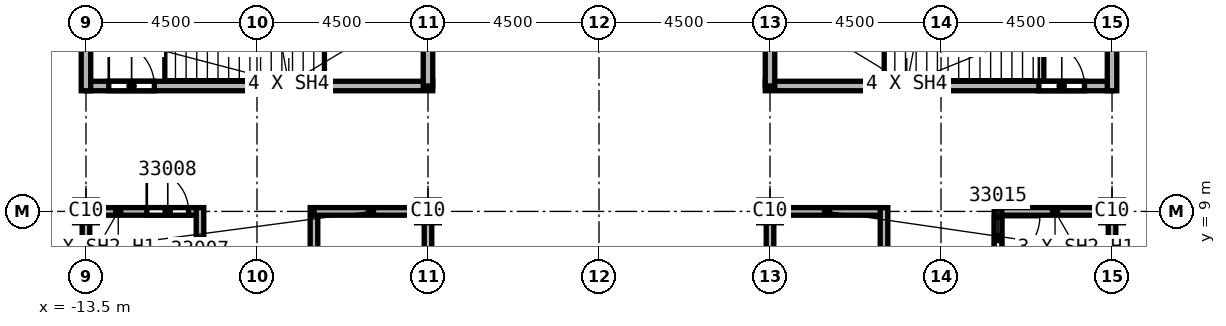
"""IFC4 building model, lengths in metres.
Left out: names, types, materials, properties, quantities, classifications, styles, units other than length and angle.
Written with IfcOpenShell. Run it as: python <this file> out.ifc"""

import sys

from ifc_helpers import new_model, si_unit, direction, frame, frame_2d, origin, origin_2d, place, context, subcontext, project, spatial, rectangle, extrude, element, fill, save


model = new_model("IFC4")
c1 = context("Model", 3, precision=1e-05, world=origin(), true_north=direction((0.0, 1.0)))
c2 = subcontext(c1, "Body", "Model", "MODEL_VIEW")
j1 = project(units=[si_unit("LENGTHUNIT", "METRE"), si_unit("PLANEANGLEUNIT", "RADIAN")], contexts=[c1])
p1 = place(None, origin())
s1 = spatial("IfcSite", under=j1, at=p1, CompositionType="ELEMENT")
p2 = place(p1, origin())
s2 = spatial("IfcBuilding", under=s1, at=p2, CompositionType="ELEMENT")
p3 = place(p2, frame((0.0, 0.0, 361.0)))
s3 = spatial("IfcBuildingStorey", under=s2, at=p3, CompositionType="ELEMENT", Elevation=361.0)
for number, where, z_axis, x_axis in (
    (1, (4.5, 9.0, 0.0), (0.0, 0.0, 1.0), (1.0, 0.0, 0.0)),
    (2, (13.5, 9.0, 0.0), (0.0, 0.0, 1.0), (1.0, 0.0, 0.0)),
    (3, (-4.5, 9.0, 0.0), (0.0, 0.0, 1.0), (1.0, 0.0, 0.0)),
    (4, (-13.5, 9.0, 0.0), (0.0, 0.0, 1.0), (1.0, 0.0, 0.0)),
):
    element("IfcColumn", number, at=place(p3, frame(where, z_axis=z_axis, x_axis=x_axis)), inside=s3, PredefinedType="COLUMN", context=c2, shape_type="SweptSolid", body=[
        extrude(rectangle(XDim=0.6, YDim=0.6, at=origin_2d()), origin(), (0.0, 0.0, 1.0), 4.6),
    ])
p4 = place(p3, frame((-13.5, 7.5, 0.0), z_axis=(0.0, 0.0, 1.0), x_axis=(0.0, 1.0, 0.0)))
e5 = element("IfcWall", 5, at=p4, inside=s3, PredefinedType="SOLIDWALL", context=c2, shape_type="SweptSolid", body=[
    extrude(rectangle(XDim=1.6, YDim=0.2, at=frame_2d((0.8, 0.0))), origin(), (0.0, 0.0, 1.0), 3.838),
])
p5 = place(p3, frame((-13.5, 9.0, 0.0), z_axis=(0.0, 0.0, 1.0), x_axis=(1.0, 0.0, 0.0)))
e6 = element("IfcWall", 6, at=p5, inside=s3, PredefinedType="SOLIDWALL", context=c2, shape_type="SweptSolid", body=[
    extrude(rectangle(XDim=3.0, YDim=0.2, at=frame_2d((1.5, 0.0))), origin(), (0.0, 0.0, 1.0), 3.838),
])
p6 = place(p5, frame((1.6, 0.0, 0.0)))
e7 = element("IfcOpeningElement", 7, at=p6, cuts=e6, PredefinedType="OPENING", context=c2, shape_type="SweptSolid", body=[
    extrude(rectangle(XDim=1.1, YDim=2.1, at=frame_2d((0.55, 1.05))), frame((0.0, 0.1, 0.0), z_axis=(0.0, -1.0, 0.0), x_axis=(1.0, 0.0, 0.0)), (0.0, 0.0, 1.0), 0.2),
])
p7 = place(p3, frame((-10.5, 7.425, 0.0), z_axis=(0.0, 0.0, 1.0), x_axis=(0.0, 1.0, 0.0)))
e8 = element("IfcWall", 8, at=p7, inside=s3, PredefinedType="SOLIDWALL", context=c2, shape_type="SweptSolid", body=[
    extrude(rectangle(XDim=1.675, YDim=0.2, at=frame_2d((0.837, 0.0))), origin(), (0.0, 0.0, 1.0), 4.15),
])
p8 = place(p3, frame((-7.5, 2.875, 0.0), z_axis=(0.0, 0.0, 1.0), x_axis=(0.0, 1.0, 0.0)))
e9 = element("IfcWall", 9, at=p8, inside=s3, PredefinedType="SOLIDWALL", context=c2, shape_type="SweptSolid", body=[
    extrude(rectangle(XDim=6.225, YDim=0.2, at=frame_2d((3.113, 0.0))), origin(), (0.0, 0.0, 1.0), 4.15),
])
p9 = place(p3, frame((-7.5, 9.0, 0.0), z_axis=(0.0, 0.0, 1.0), x_axis=(1.0, 0.0, 0.0)))
e10 = element("IfcWall", 10, at=p9, inside=s3, PredefinedType="SOLIDWALL", context=c2, shape_type="SweptSolid", body=[
    extrude(rectangle(XDim=3.0, YDim=0.2, at=frame_2d((1.5, 0.0))), origin(), (0.0, 0.0, 1.0), 3.838),
])
p10 = place(p3, frame((-4.5, 9.1, 0.0), z_axis=(0.0, 0.0, 1.0), x_axis=(0.0, -1.0, 0.0)))
e11 = element("IfcWall", 11, at=p10, inside=s3, PredefinedType="SOLIDWALL", context=c2, shape_type="SweptSolid", body=[
    extrude(rectangle(XDim=18.2, YDim=0.2, at=frame_2d((9.1, 0.0))), origin(), (0.0, 0.0, 1.0), 3.838),
])
p11 = place(p10, frame((9.95, 0.0, 0.0)))
e12 = element("IfcOpeningElement", 12, at=p11, cuts=e11, PredefinedType="OPENING", context=c2, shape_type="SweptSolid", body=[
    extrude(rectangle(XDim=1.1, YDim=2.1, at=frame_2d((0.55, 1.05))), frame((0.0, 0.1, 0.0), z_axis=(0.0, -1.0, 0.0), x_axis=(1.0, 0.0, 0.0)), (0.0, 0.0, 1.0), 0.2),
])
p12 = place(p10, frame((4.75, 0.0, 0.0)))
e13 = element("IfcOpeningElement", 13, at=p12, cuts=e11, PredefinedType="OPENING", context=c2, shape_type="SweptSolid", body=[
    extrude(rectangle(XDim=1.1, YDim=2.1, at=frame_2d((0.55, 1.05))), frame((0.0, 0.1, 0.0), z_axis=(0.0, -1.0, 0.0), x_axis=(1.0, 0.0, 0.0)), (0.0, 0.0, 1.0), 0.2),
])
p13 = place(p3, frame((4.5, -9.1, 0.0), z_axis=(0.0, 0.0, 1.0), x_axis=(0.0, 1.0, 0.0)))
e14 = element("IfcWall", 14, at=p13, inside=s3, PredefinedType="SOLIDWALL", context=c2, shape_type="SweptSolid", body=[
    extrude(rectangle(XDim=18.2, YDim=0.2, at=frame_2d((9.1, 0.0))), origin(), (0.0, 0.0, 1.0), 3.838),
])
p14 = place(p13, frame((5.5, 0.0, 0.0)))
e15 = element("IfcOpeningElement", 15, at=p14, cuts=e14, PredefinedType="OPENING", context=c2, shape_type="SweptSolid", body=[
    extrude(rectangle(XDim=1.1, YDim=2.1, at=frame_2d((0.55, 1.05))), frame((0.0, 0.1, 0.0), z_axis=(0.0, -1.0, 0.0), x_axis=(1.0, 0.0, 0.0)), (0.0, 0.0, 1.0), 0.2),
])
p15 = place(p13, frame((13.7, 0.0, 0.0)))
e16 = element("IfcOpeningElement", 16, at=p15, cuts=e14, PredefinedType="OPENING", context=c2, shape_type="SweptSolid", body=[
    extrude(rectangle(XDim=1.1, YDim=2.1, at=frame_2d((0.55, 1.05))), frame((0.0, 0.1, 0.0), z_axis=(0.0, -1.0, 0.0), x_axis=(1.0, 0.0, 0.0)), (0.0, 0.0, 1.0), 0.2),
])
p16 = place(p3, frame((4.5, 9.0, 0.0), z_axis=(0.0, 0.0, 1.0), x_axis=(1.0, 0.0, 0.0)))
e17 = element("IfcWall", 17, at=p16, inside=s3, PredefinedType="SOLIDWALL", context=c2, shape_type="SweptSolid", body=[
    extrude(rectangle(XDim=3.0, YDim=0.2, at=frame_2d((1.5, 0.0))), origin(), (0.0, 0.0, 1.0), 3.838),
])
p17 = place(p3, frame((7.5, 9.1, 0.0), z_axis=(0.0, 0.0, 1.0), x_axis=(0.0, -1.0, 0.0)))
e18 = element("IfcWall", 18, at=p17, inside=s3, PredefinedType="SOLIDWALL", context=c2, shape_type="SweptSolid", body=[
    extrude(rectangle(XDim=6.225, YDim=0.2, at=frame_2d((3.113, 0.0))), origin(), (0.0, 0.0, 1.0), 4.15),
])
p18 = place(p3, frame((10.5, 9.0, 0.0), z_axis=(0.0, 0.0, 1.0), x_axis=(1.0, 0.0, 0.0)))
e19 = element("IfcWall", 19, at=p18, inside=s3, PredefinedType="SOLIDWALL", context=c2, shape_type="SweptSolid", body=[
    extrude(rectangle(XDim=3.0, YDim=0.2, at=frame_2d((1.5, 0.0))), origin(), (0.0, 0.0, 1.0), 3.838),
])
p19 = place(p3, frame((10.5, 9.1, 0.0), z_axis=(0.0, 0.0, 1.0), x_axis=(0.0, -1.0, 0.0)))
e20 = element("IfcWall", 20, at=p19, inside=s3, PredefinedType="SOLIDWALL", context=c2, shape_type="SweptSolid", body=[
    extrude(rectangle(XDim=3.225, YDim=0.2, at=frame_2d((1.613, 0.0))), origin(), (0.0, 0.0, 1.0), 4.15),
])
p20 = place(p19, frame((0.25, 0.0, 0.0)))
e21 = element("IfcOpeningElement", 21, at=p20, cuts=e20, PredefinedType="OPENING", context=c2, shape_type="SweptSolid", body=[
    extrude(rectangle(XDim=1.1, YDim=2.1, at=frame_2d((0.55, 1.05))), frame((0.0, 0.1, 0.0), z_axis=(0.0, -1.0, 0.0), x_axis=(1.0, 0.0, 0.0)), (0.0, 0.0, 1.0), 0.2),
])
p21 = place(p3, frame((13.5, 9.1, 0.0), z_axis=(0.0, 0.0, 1.0), x_axis=(0.0, -1.0, 0.0)))
e22 = element("IfcWall", 22, at=p21, inside=s3, PredefinedType="SOLIDWALL", context=c2, shape_type="SweptSolid", body=[
    extrude(rectangle(XDim=3.1, YDim=0.2, at=frame_2d((1.55, 0.0))), origin(), (0.0, 0.0, 1.0), 3.838),
])
p22 = place(p3, frame((-13.5, 12.3, 0.0), z_axis=(0.0, 0.0, 1.0), x_axis=(1.0, 0.0, 0.0)))
e23 = element("IfcWall", 23, at=p22, inside=s3, PredefinedType="SOLIDWALL", context=c2, shape_type="SweptSolid", body=[
    extrude(rectangle(XDim=9.125, YDim=0.25, at=frame_2d((4.562, 0.0))), origin(), (0.0, 0.0, 1.0), 4.15),
])
p23 = place(p22, frame((0.6, 0.0, 0.0)))
e24 = element("IfcOpeningElement", 24, at=p23, cuts=e23, PredefinedType="OPENING", context=c2, shape_type="SweptSolid", body=[
    extrude(rectangle(XDim=1.2, YDim=2.1, at=frame_2d((0.6, 1.05))), frame((0.0, 0.125, 0.0), z_axis=(0.0, -1.0, 0.0), x_axis=(1.0, 0.0, 0.0)), (0.0, 0.0, 1.0), 0.25),
])
p24 = place(p3, frame((-13.5, 12.175, 0.0), z_axis=(0.0, 0.0, 1.0), x_axis=(0.0, 1.0, 0.0)))
e25 = element("IfcWall", 25, at=p24, inside=s3, PredefinedType="SOLIDWALL", context=c2, shape_type="SweptSolid", body=[
    extrude(rectangle(XDim=4.75, YDim=0.25, at=frame_2d((2.375, 0.0))), origin(), (0.0, 0.0, 1.0), 4.15),
])
p25 = place(p3, frame((-4.5, 16.925, 0.0), z_axis=(0.0, 0.0, 1.0), x_axis=(0.0, -1.0, 0.0)))
e26 = element("IfcWall", 26, at=p25, inside=s3, PredefinedType="SOLIDWALL", context=c2, shape_type="SweptSolid", body=[
    extrude(rectangle(XDim=4.625, YDim=0.25, at=frame_2d((2.312, 0.0))), origin(), (0.0, 0.0, 1.0), 4.15),
])
p26 = place(p3, frame((4.375, 12.3, 0.0), z_axis=(0.0, 0.0, 1.0), x_axis=(1.0, 0.0, 0.0)))
e27 = element("IfcWall", 27, at=p26, inside=s3, PredefinedType="SOLIDWALL", context=c2, shape_type="SweptSolid", body=[
    extrude(rectangle(XDim=9.125, YDim=0.25, at=frame_2d((4.562, 0.0))), origin(), (0.0, 0.0, 1.0), 4.15),
])
p27 = place(p26, frame((7.2, 0.0, 0.0)))
e28 = element("IfcOpeningElement", 28, at=p27, cuts=e27, PredefinedType="OPENING", context=c2, shape_type="SweptSolid", body=[
    extrude(rectangle(XDim=1.2, YDim=2.1, at=frame_2d((0.6, 1.05))), frame((0.0, 0.125, 0.0), z_axis=(0.0, -1.0, 0.0), x_axis=(1.0, 0.0, 0.0)), (0.0, 0.0, 1.0), 0.25),
])
p28 = place(p3, frame((4.5, 12.3, 0.0), z_axis=(0.0, 0.0, 1.0), x_axis=(0.0, 1.0, 0.0)))
e29 = element("IfcWall", 29, at=p28, inside=s3, PredefinedType="SOLIDWALL", context=c2, shape_type="SweptSolid", body=[
    extrude(rectangle(XDim=4.625, YDim=0.25, at=frame_2d((2.312, 0.0))), origin(), (0.0, 0.0, 1.0), 4.15),
])
p29 = place(p3, frame((13.5, 12.175, 0.0), z_axis=(0.0, 0.0, 1.0), x_axis=(0.0, 1.0, 0.0)))
e30 = element("IfcWall", 30, at=p29, inside=s3, PredefinedType="SOLIDWALL", context=c2, shape_type="SweptSolid", body=[
    extrude(rectangle(XDim=4.75, YDim=0.25, at=frame_2d((2.375, 0.0))), origin(), (0.0, 0.0, 1.0), 4.15),
])
p30 = place(p6, origin())
e31 = element("IfcDoor", 31, at=p30, inside=s3, OperationType="SINGLE_SWING_LEFT", PredefinedType="DOOR", context=c2, shape_type="SweptSolid", body=[
    extrude(rectangle(XDim=1.1, YDim=2.1, at=frame_2d((0.55, 1.05))), frame((0.0, 0.025, 0.0), z_axis=(0.0, -1.0, 0.0), x_axis=(1.0, 0.0, 0.0)), (0.0, 0.0, 1.0), 0.05),
])
fill(e7, e31)
p31 = place(p20, origin())
e32 = element("IfcDoor", 32, at=p31, inside=s3, OperationType="SINGLE_SWING_RIGHT", PredefinedType="DOOR", context=c2, shape_type="SweptSolid", body=[
    extrude(rectangle(XDim=1.1, YDim=2.1, at=frame_2d((0.55, 1.05))), frame((0.0, 0.025, 0.0), z_axis=(0.0, -1.0, 0.0), x_axis=(1.0, 0.0, 0.0)), (0.0, 0.0, 1.0), 0.05),
])
fill(e21, e32)
p32 = place(p23, origin())
e33 = element("IfcDoor", 33, at=p32, inside=s3, OperationType="SINGLE_SWING_LEFT", PredefinedType="DOOR", context=c2, shape_type="SweptSolid", body=[
    extrude(rectangle(XDim=1.2, YDim=2.1, at=frame_2d((0.6, 1.05))), frame((0.0, 0.025, 0.0), z_axis=(0.0, -1.0, 0.0), x_axis=(1.0, 0.0, 0.0)), (0.0, 0.0, 1.0), 0.05),
])
fill(e24, e33)
p33 = place(p27, origin())
e34 = element("IfcDoor", 34, at=p33, inside=s3, OperationType="SINGLE_SWING_LEFT", PredefinedType="DOOR", context=c2, shape_type="SweptSolid", body=[
    extrude(rectangle(XDim=1.2, YDim=2.1, at=frame_2d((0.6, 1.05))), frame((0.0, 0.025, 0.0), z_axis=(0.0, -1.0, 0.0), x_axis=(1.0, 0.0, 0.0)), (0.0, 0.0, 1.0), 0.05),
])
fill(e28, e34)
save(model, sys.argv[1])
